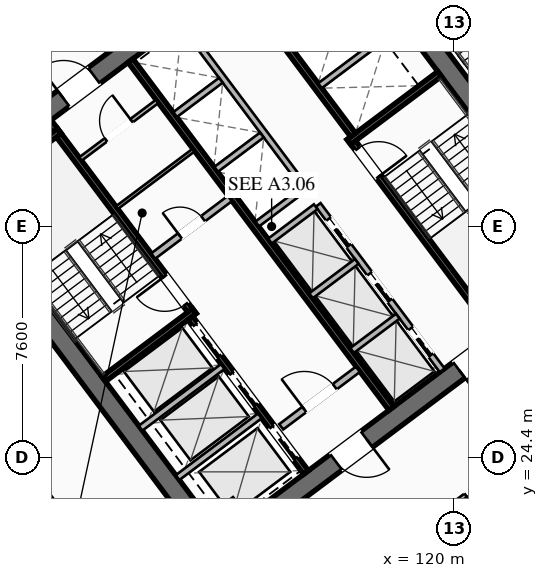
"""IFC4 building model, lengths in metres.
Left out: names, types, materials, properties, quantities, classifications, styles, units other than length and angle.
Written with IfcOpenShell. Run it as: python <this file> out.ifc"""

import sys

from ifc_helpers import new_model, si_unit, direction, frame, frame_2d, origin, place, context, subcontext, project, spatial, rectangle, extrude, element, fill, save


model = new_model("IFC4")
c1 = context("Model", 3, precision=1e-05, world=origin(), true_north=direction((0.0, 1.0)))
c2 = subcontext(c1, "Body", "Model", "MODEL_VIEW")
j1 = project(units=[si_unit("LENGTHUNIT", "METRE"), si_unit("PLANEANGLEUNIT", "RADIAN")], contexts=[c1])
p1 = place(None, origin())
s1 = spatial("IfcSite", under=j1, at=p1, CompositionType="ELEMENT")
p2 = place(p1, origin())
s2 = spatial("IfcBuilding", under=s1, at=p2, CompositionType="ELEMENT")
p3 = place(p2, frame((0.0, 0.0, 99.15)))
s3 = spatial("IfcBuildingStorey", under=s2, at=p3, CompositionType="ELEMENT", Elevation=99.15)
for number, where, z_axis, x_axis in (
    (1, (112.476, 21.107, 0.0), (0.0, 0.0, 1.0), (-0.6, 0.8, 0.0)),
    (2, (115.524, 42.893, 0.0), (0.0, 0.0, 1.0), (0.6, -0.8, 0.0)),
):
    element("IfcWall", number, at=place(p3, frame(where, z_axis=z_axis, x_axis=x_axis)), inside=s3, PredefinedType="SHEAR", context=c2, shape_type="SweptSolid", body=[
        extrude(rectangle(XDim=15.6, YDim=0.65, at=frame_2d((7.8, 0.0))), origin(), (0.0, 0.0, 1.0), 3.55),
    ])
p4 = place(p3, frame((124.429, 30.478, 0.0), z_axis=(0.0, 0.0, 1.0), x_axis=(-0.799998028465, -0.600002628705, 0.0)))
e3 = element("IfcWall", 3, at=p4, inside=s3, PredefinedType="SHEAR", context=c2, shape_type="SweptSolid", body=[
    extrude(rectangle(XDim=14.86, YDim=0.65, at=frame_2d((7.43, 0.0))), origin(), (0.0, 0.0, 1.0), 3.55),
])
p5 = place(p4, frame((9.13, 0.0, 0.0)))
e4 = element("IfcOpeningElement", 4, at=p5, cuts=e3, PredefinedType="OPENING", context=c2, shape_type="SweptSolid", body=[
    extrude(rectangle(XDim=1.25, YDim=2.25, at=frame_2d((0.625, 1.125))), frame((0.0, 0.335, 0.0), z_axis=(0.0, -1.0, 0.0), x_axis=(1.0, 0.0, 0.0)), (0.0, 0.0, 1.0), 0.67),
])
p6 = place(p4, frame((4.08, 0.0, 0.0)))
e5 = element("IfcOpeningElement", 5, at=p6, cuts=e3, PredefinedType="OPENING", context=c2, shape_type="SweptSolid", body=[
    extrude(rectangle(XDim=1.25, YDim=2.25, at=frame_2d((0.625, 1.125))), frame((0.0, 0.335, 0.0), z_axis=(0.0, -1.0, 0.0), x_axis=(1.0, 0.0, 0.0)), (0.0, 0.0, 1.0), 0.67),
])
p7 = place(p3, frame((103.571, 33.522, 0.0), z_axis=(0.0, 0.0, 1.0), x_axis=(0.799998028465, 0.600002628705, 0.0)))
e6 = element("IfcWall", 6, at=p7, inside=s3, PredefinedType="SHEAR", context=c2, shape_type="SweptSolid", body=[
    extrude(rectangle(XDim=14.86, YDim=0.65, at=frame_2d((7.43, 0.0))), origin(), (0.0, 0.0, 1.0), 3.55),
])
p8 = place(p7, frame((4.48, 0.0, 0.0)))
e7 = element("IfcOpeningElement", 7, at=p8, cuts=e6, PredefinedType="OPENING", context=c2, shape_type="SweptSolid", body=[
    extrude(rectangle(XDim=1.25, YDim=2.25, at=frame_2d((0.625, 1.125))), frame((0.0, 0.335, 0.0), z_axis=(0.0, -1.0, 0.0), x_axis=(1.0, 0.0, 0.0)), (0.0, 0.0, 1.0), 0.67),
])
p9 = place(p7, frame((9.53, 0.0, 0.0)))
e8 = element("IfcOpeningElement", 8, at=p9, cuts=e6, PredefinedType="OPENING", context=c2, shape_type="SweptSolid", body=[
    extrude(rectangle(XDim=1.25, YDim=2.25, at=frame_2d((0.625, 1.125))), frame((0.0, 0.335, 0.0), z_axis=(0.0, -1.0, 0.0), x_axis=(1.0, 0.0, 0.0)), (0.0, 0.0, 1.0), 0.67),
])
p10 = place(p3, frame((111.44, 29.08, 0.0), z_axis=(0.0, 0.0, 1.0), x_axis=(-0.600009827119, 0.799992629566, 0.0)))
e9 = element("IfcWall", 9, at=p10, inside=s3, PredefinedType="SHEAR", context=c2, shape_type="SweptSolid", body=[
    extrude(rectangle(XDim=7.95, YDim=0.2, at=frame_2d((3.975, 0.0))), origin(), (0.0, 0.0, 1.0), 3.35),
])
p11 = place(p10, frame((0.45, 0.0, 0.0)))
e10 = element("IfcOpeningElement", 10, at=p11, cuts=e9, PredefinedType="OPENING", context=c2, shape_type="SweptSolid", body=[
    extrude(rectangle(XDim=1.15, YDim=2.2, at=frame_2d((0.575, 1.1))), frame((0.0, 0.11, 0.0), z_axis=(0.0, -1.0, 0.0), x_axis=(1.0, 0.0, 0.0)), (0.0, 0.0, 1.0), 0.22),
])
for number, where, z_axis, x_axis in (
    (11, (108.476, 26.982, 0.0), (0.0, 0.0, 1.0), (0.8, 0.6, 0.0)),
    (12, (104.036, 32.902, 0.0), (0.0, 0.0, 1.0), (0.8, 0.6, 0.0)),
):
    element("IfcWall", number, at=place(p3, frame(where, z_axis=z_axis, x_axis=x_axis)), inside=s3, PredefinedType="SHEAR", context=c2, shape_type="SweptSolid", body=[
        extrude(rectangle(XDim=3.73, YDim=0.2, at=frame_2d((1.865, 0.0))), origin(), (0.0, 0.0, 1.0), 3.35),
    ])
p12 = place(p3, frame((116.56, 34.92, 0.0), z_axis=(0.0, 0.0, 1.0), x_axis=(0.600009827119, -0.799992629566, 0.0)))
e13 = element("IfcWall", 13, at=p12, inside=s3, PredefinedType="SHEAR", context=c2, shape_type="SweptSolid", body=[
    extrude(rectangle(XDim=7.95, YDim=0.2, at=frame_2d((3.975, 0.0))), origin(), (0.0, 0.0, 1.0), 3.35),
])
p13 = place(p12, frame((0.45, 0.0, 0.0)))
e14 = element("IfcOpeningElement", 14, at=p13, cuts=e13, PredefinedType="OPENING", context=c2, shape_type="SweptSolid", body=[
    extrude(rectangle(XDim=1.15, YDim=2.2, at=frame_2d((0.575, 1.1))), frame((0.0, 0.11, 0.0), z_axis=(0.0, -1.0, 0.0), x_axis=(1.0, 0.0, 0.0)), (0.0, 0.0, 1.0), 0.22),
])
p14 = place(p3, frame((116.54, 34.78, 0.0), z_axis=(0.0, 0.0, 1.0), x_axis=(0.799984290658, 0.600020945218, 0.0)))
e15 = element("IfcWall", 15, at=p14, inside=s3, PredefinedType="SHEAR", context=c2, shape_type="SweptSolid", body=[
    extrude(rectangle(XDim=3.73, YDim=0.2, at=frame_2d((1.865, 0.0))), origin(), (0.0, 0.0, 1.0), 3.35),
])
p15 = place(p3, frame((117.938, 26.016, 0.0), z_axis=(0.0, 0.0, 1.0), x_axis=(-0.600005463273, 0.799995902516, 0.0)))
e16 = element("IfcWall", 16, at=p15, inside=s3, PredefinedType="SHEAR", context=c2, shape_type="SweptSolid", body=[
    extrude(rectangle(XDim=14.3, YDim=0.2, at=frame_2d((7.15, 0.0))), origin(), (0.0, 0.0, 1.0), 3.35),
])
p16 = place(p3, frame((110.104, 31.028, 0.0), z_axis=(0.0, 0.0, 1.0), x_axis=(0.800018601094, 0.59997519774, 0.0)))
e17 = element("IfcWall", 17, at=p16, inside=s3, PredefinedType="SOLIDWALL", context=c2, shape_type="SweptSolid", body=[
    extrude(rectangle(XDim=3.15, YDim=0.22, at=frame_2d((1.575, 0.0))), origin(), (0.0, 0.0, 1.0), 2.703),
])
p17 = place(p16, frame((1.1, 0.0, 0.0)))
e18 = element("IfcOpeningElement", 18, at=p17, cuts=e17, PredefinedType="OPENING", context=c2, shape_type="SweptSolid", body=[
    extrude(rectangle(XDim=0.95, YDim=2.05, at=frame_2d((0.475, 1.025))), frame((0.0, 0.12, 0.0), z_axis=(0.0, -1.0, 0.0), x_axis=(1.0, 0.0, 0.0)), (0.0, 0.0, 1.0), 0.24),
])
p18 = place(p3, frame((114.316, 25.412, 0.0), z_axis=(0.0, 0.0, 1.0), x_axis=(0.800018601094, 0.59997519774, 0.0)))
e19 = element("IfcWall", 19, at=p18, inside=s3, PredefinedType="SOLIDWALL", context=c2, shape_type="SweptSolid", body=[
    extrude(rectangle(XDim=3.15, YDim=0.22, at=frame_2d((1.575, 0.0))), origin(), (0.0, 0.0, 1.0), 2.703),
])
p19 = place(p18, frame((0.95, 0.0, 0.0)))
e20 = element("IfcOpeningElement", 20, at=p19, cuts=e19, PredefinedType="OPENING", context=c2, shape_type="SweptSolid", body=[
    extrude(rectangle(XDim=1.25, YDim=2.25, at=frame_2d((0.625, 1.125))), frame((0.0, 0.12, 0.0), z_axis=(0.0, -1.0, 0.0), x_axis=(1.0, 0.0, 0.0)), (0.0, 0.0, 1.0), 0.24),
])
p20 = place(p3, frame((115.13, 23.91, 0.0), z_axis=(0.0, 0.0, 1.0), x_axis=(-0.599975393228, 0.800018454488, 0.0)))
e21 = element("IfcWall", 21, at=p20, inside=s3, PredefinedType="SHEAR", context=c2, shape_type="SweptSolid", body=[
    extrude(rectangle(XDim=6.35, YDim=0.2, at=frame_2d((3.175, 0.0))), origin(), (0.0, 0.0, 1.0), 3.35),
])
p21 = place(p20, frame((4.775, 0.0, 0.0)))
e22 = element("IfcOpeningElement", 22, at=p21, cuts=e21, PredefinedType="OPENING", context=c2, shape_type="SweptSolid", body=[
    extrude(rectangle(XDim=1.3, YDim=2.25, at=frame_2d((0.65, 1.125))), frame((0.0, 0.11, 0.0), z_axis=(0.0, -1.0, 0.0), x_axis=(1.0, 0.0, 0.0)), (0.0, 0.0, 1.0), 0.22),
])
p22 = place(p20, frame((2.775, 0.0, 0.0)))
e23 = element("IfcOpeningElement", 23, at=p22, cuts=e21, PredefinedType="OPENING", context=c2, shape_type="SweptSolid", body=[
    extrude(rectangle(XDim=1.3, YDim=2.25, at=frame_2d((0.65, 1.125))), frame((0.0, 0.11, 0.0), z_axis=(0.0, -1.0, 0.0), x_axis=(1.0, 0.0, 0.0)), (0.0, 0.0, 1.0), 0.22),
])
p23 = place(p20, frame((0.575, 0.0, 0.0)))
e24 = element("IfcOpeningElement", 24, at=p23, cuts=e21, PredefinedType="OPENING", context=c2, shape_type="SweptSolid", body=[
    extrude(rectangle(XDim=1.3, YDim=2.25, at=frame_2d((0.65, 1.125))), frame((0.0, 0.11, 0.0), z_axis=(0.0, -1.0, 0.0), x_axis=(1.0, 0.0, 0.0)), (0.0, 0.0, 1.0), 0.22),
])
for number, where, z_axis, x_axis in (
    (25, (110.906, 23.742, 0.0), (0.0, 0.0, 1.0), (0.8, 0.6, 0.0)),
    (26, (109.688, 25.366, 0.0), (0.0, 0.0, 1.0), (0.8, 0.6, 0.0)),
):
    element("IfcWall", number, at=place(p3, frame(where, z_axis=z_axis, x_axis=x_axis)), inside=s3, PredefinedType="SOLIDWALL", context=c2, shape_type="SweptSolid", body=[
        extrude(rectangle(XDim=3.38, YDim=0.2, at=frame_2d((1.69, 0.0))), origin(), (0.0, 0.0, 1.0), 3.35),
    ])
p24 = place(p3, frame((112.87, 40.09, 0.0), z_axis=(0.0, 0.0, 1.0), x_axis=(0.599975393228, -0.800018454488, 0.0)))
e27 = element("IfcWall", 27, at=p24, inside=s3, PredefinedType="SHEAR", context=c2, shape_type="SweptSolid", body=[
    extrude(rectangle(XDim=6.35, YDim=0.2, at=frame_2d((3.175, 0.0))), origin(), (0.0, 0.0, 1.0), 3.35),
])
p25 = place(p3, frame((115.59, 36.63, 0.0), z_axis=(0.0, 0.0, 1.0), x_axis=(0.799973995579, 0.600034670996, 0.0)))
e28 = element("IfcWall", 28, at=p25, inside=s3, PredefinedType="SOLIDWALL", context=c2, shape_type="SweptSolid", body=[
    extrude(rectangle(XDim=3.38, YDim=0.2, at=frame_2d((1.69, 0.0))), origin(), (0.0, 0.0, 1.0), 3.35),
])
p26 = place(p3, frame((107.71, 34.22, 0.0), z_axis=(0.0, 0.0, 1.0), x_axis=(0.799981399002, 0.60002480053, 0.0)))
e29 = element("IfcWall", 29, at=p26, inside=s3, PredefinedType="PARTITIONING", context=c2, shape_type="SweptSolid", body=[
    extrude(rectangle(XDim=3.15, YDim=0.135, at=frame_2d((1.575, 0.0))), origin(), (0.0, 0.0, 1.0), 2.703),
])
p27 = place(p26, frame((1.05, 0.0, 0.0)))
e30 = element("IfcOpeningElement", 30, at=p27, cuts=e29, PredefinedType="OPENING", context=c2, shape_type="SweptSolid", body=[
    extrude(rectangle(XDim=1.05, YDim=2.2, at=frame_2d((0.525, 1.1))), frame((0.0, 0.077, 0.0), z_axis=(0.0, -1.0, 0.0), x_axis=(1.0, 0.0, 0.0)), (0.0, 0.0, 1.0), 0.155),
])
p28 = place(p3, frame((108.91, 32.62, 0.0), z_axis=(0.0, 0.0, 1.0), x_axis=(0.800018601094, 0.59997519774, 0.0)))
e31 = element("IfcWall", 31, at=p28, inside=s3, PredefinedType="PARTITIONING", context=c2, shape_type="SweptSolid", body=[
    extrude(rectangle(XDim=3.15, YDim=0.11, at=frame_2d((1.575, 0.0))), origin(), (0.0, 0.0, 1.0), 2.703),
])
p29 = place(p3, frame((119.61, 27.27, 0.0), z_axis=(0.0, 0.0, 1.0), x_axis=(-0.600011488909, 0.79999138319, 0.0)))
e32 = element("IfcWall", 32, at=p29, inside=s3, PredefinedType="SOLIDWALL", context=c2, shape_type="SweptSolid", body=[
    extrude(rectangle(XDim=6.8, YDim=0.2, at=frame_2d((3.4, 0.0))), origin(), (0.0, 0.0, 1.0), 3.35),
])
p30 = place(p29, frame((0.625, 0.0, 0.0)))
e33 = element("IfcOpeningElement", 33, at=p30, cuts=e32, PredefinedType="OPENING", context=c2, shape_type="SweptSolid", body=[
    extrude(rectangle(XDim=1.1, YDim=2.2, at=frame_2d((0.55, 1.1))), frame((0.0, 0.11, 0.0), z_axis=(0.0, -1.0, 0.0), x_axis=(1.0, 0.0, 0.0)), (0.0, 0.0, 1.0), 0.22),
])
p31 = place(p29, frame((2.875, 0.0, 0.0)))
e34 = element("IfcOpeningElement", 34, at=p31, cuts=e32, PredefinedType="OPENING", context=c2, shape_type="SweptSolid", body=[
    extrude(rectangle(XDim=1.1, YDim=2.2, at=frame_2d((0.55, 1.1))), frame((0.0, 0.11, 0.0), z_axis=(0.0, -1.0, 0.0), x_axis=(1.0, 0.0, 0.0)), (0.0, 0.0, 1.0), 0.22),
])
p32 = place(p29, frame((5.125, 0.0, 0.0)))
e35 = element("IfcOpeningElement", 35, at=p32, cuts=e32, PredefinedType="OPENING", context=c2, shape_type="SweptSolid", body=[
    extrude(rectangle(XDim=1.1, YDim=2.2, at=frame_2d((0.55, 1.1))), frame((0.0, 0.11, 0.0), z_axis=(0.0, -1.0, 0.0), x_axis=(1.0, 0.0, 0.0)), (0.0, 0.0, 1.0), 0.22),
])
p33 = place(p3, frame((116.646, 27.922, 0.0), z_axis=(0.0, 0.0, 1.0), x_axis=(0.8, 0.6, 0.0)))
e36 = element("IfcWall", 36, at=p33, inside=s3, PredefinedType="SOLIDWALL", context=c2, shape_type="SweptSolid", body=[
    extrude(rectangle(XDim=1.88, YDim=0.2, at=frame_2d((0.94, 0.0))), origin(), (0.0, 0.0, 1.0), 3.35),
])
p34 = place(p3, frame((115.296, 29.722, 0.0), z_axis=(0.0, 0.0, 1.0), x_axis=(0.799984418148, 0.600020775241, 0.0)))
e37 = element("IfcWall", 37, at=p34, inside=s3, PredefinedType="SOLIDWALL", context=c2, shape_type="SweptSolid", body=[
    extrude(rectangle(XDim=1.88, YDim=0.2, at=frame_2d((0.94, 0.0))), origin(), (0.0, 0.0, 1.0), 3.35),
])
p35 = place(p3, frame((113.946, 31.522, 0.0), z_axis=(0.0, 0.0, 1.0), x_axis=(0.8, 0.6, 0.0)))
e38 = element("IfcWall", 38, at=p35, inside=s3, PredefinedType="SOLIDWALL", context=c2, shape_type="SweptSolid", body=[
    extrude(rectangle(XDim=1.88, YDim=0.2, at=frame_2d((0.94, 0.0))), origin(), (0.0, 0.0, 1.0), 3.35),
])
p36 = place(p3, frame((115.11, 33.27, 0.0), z_axis=(0.0, 0.0, 1.0), x_axis=(-0.600011488909, 0.79999138319, 0.0)))
e39 = element("IfcWall", 39, at=p36, inside=s3, PredefinedType="SOLIDWALL", context=c2, shape_type="SweptSolid", body=[
    extrude(rectangle(XDim=6.8, YDim=0.2, at=frame_2d((3.4, 0.0))), origin(), (0.0, 0.0, 1.0), 3.35),
])
p37 = place(p3, frame((113.526, 32.082, 0.0), z_axis=(0.0, 0.0, 1.0), x_axis=(0.800046745961, 0.599937666993, 0.0)))
e40 = element("IfcWall", 40, at=p37, inside=s3, PredefinedType="SOLIDWALL", context=c2, shape_type="SweptSolid", body=[
    extrude(rectangle(XDim=1.88, YDim=0.2, at=frame_2d((0.94, 0.0))), origin(), (0.0, 0.0, 1.0), 3.35),
])
p38 = place(p3, frame((112.176, 33.882, 0.0), z_axis=(0.0, 0.0, 1.0), x_axis=(0.8, 0.6, 0.0)))
e41 = element("IfcWall", 41, at=p38, inside=s3, PredefinedType="SOLIDWALL", context=c2, shape_type="SweptSolid", body=[
    extrude(rectangle(XDim=1.88, YDim=0.2, at=frame_2d((0.94, 0.0))), origin(), (0.0, 0.0, 1.0), 3.35),
])
p39 = place(p3, frame((110.826, 35.682, 0.0), z_axis=(0.0, 0.0, 1.0), x_axis=(0.799984418148, 0.600020775241, 0.0)))
e42 = element("IfcWall", 42, at=p39, inside=s3, PredefinedType="SOLIDWALL", context=c2, shape_type="SweptSolid", body=[
    extrude(rectangle(XDim=1.88, YDim=0.2, at=frame_2d((0.94, 0.0))), origin(), (0.0, 0.0, 1.0), 3.35),
])
p40 = place(p3, frame((98.516, 34.012, 0.0), z_axis=(0.0, 0.0, 1.0), x_axis=(0.8, 0.6, 0.0)))
e43 = element("IfcWall", 43, at=p40, inside=s3, PredefinedType="PARTITIONING", context=c2, shape_type="SweptSolid", body=[
    extrude(rectangle(XDim=28.23, YDim=0.135, at=frame_2d((14.115, 0.0))), origin(), (0.0, 0.0, 1.0), 2.703),
])
p41 = place(p40, frame((0.3, 0.0, 0.0)))
e44 = element("IfcOpeningElement", 44, at=p41, cuts=e43, PredefinedType="OPENING", context=c2, shape_type="SweptSolid", body=[
    extrude(rectangle(XDim=0.95, YDim=2.05, at=frame_2d((0.475, 1.025))), frame((0.0, 0.077, 0.0), z_axis=(0.0, -1.0, 0.0), x_axis=(1.0, 0.0, 0.0)), (0.0, 0.0, 1.0), 0.155),
])
p42 = place(p40, frame((10.962, 0.0, 0.0)))
e45 = element("IfcOpeningElement", 45, at=p42, cuts=e43, PredefinedType="OPENING", context=c2, shape_type="SweptSolid", body=[
    extrude(rectangle(XDim=0.95, YDim=2.05, at=frame_2d((0.475, 1.025))), frame((0.0, 0.077, 0.0), z_axis=(0.0, -1.0, 0.0), x_axis=(1.0, 0.0, 0.0)), (0.0, 0.0, 1.0), 0.155),
])
p43 = place(p40, frame((26.98, 0.0, 0.0)))
e46 = element("IfcOpeningElement", 46, at=p43, cuts=e43, PredefinedType="OPENING", context=c2, shape_type="SweptSolid", body=[
    extrude(rectangle(XDim=0.95, YDim=2.05, at=frame_2d((0.475, 1.025))), frame((0.0, 0.077, 0.0), z_axis=(0.0, -1.0, 0.0), x_axis=(1.0, 0.0, 0.0)), (0.0, 0.0, 1.0), 0.155),
])
p44 = place(p3, frame((134.18, 33.51, 0.0), z_axis=(0.0, 0.0, 1.0), x_axis=(-0.8, -0.6, 0.0)))
e47 = element("IfcWall", 47, at=p44, inside=s3, PredefinedType="PARTITIONING", context=c2, shape_type="SweptSolid", body=[
    extrude(rectangle(XDim=28.23, YDim=0.135, at=frame_2d((14.115, 0.0))), origin(), (0.0, 0.0, 1.0), 2.703),
])
p45 = place(p44, frame((26.9, 0.0, 0.0)))
e48 = element("IfcOpeningElement", 48, at=p45, cuts=e47, PredefinedType="OPENING", context=c2, shape_type="SweptSolid", body=[
    extrude(rectangle(XDim=0.95, YDim=2.05, at=frame_2d((0.475, 1.025))), frame((0.0, 0.077, 0.0), z_axis=(0.0, -1.0, 0.0), x_axis=(1.0, 0.0, 0.0)), (0.0, 0.0, 1.0), 0.155),
])
p46 = place(p44, frame((16.296, 0.0, 0.0)))
e49 = element("IfcOpeningElement", 49, at=p46, cuts=e47, PredefinedType="OPENING", context=c2, shape_type="SweptSolid", body=[
    extrude(rectangle(XDim=0.95, YDim=2.05, at=frame_2d((0.475, 1.025))), frame((0.0, 0.077, 0.0), z_axis=(0.0, -1.0, 0.0), x_axis=(1.0, 0.0, 0.0)), (0.0, 0.0, 1.0), 0.155),
])
p47 = place(p44, frame((10.433, 0.0, 0.0)))
e50 = element("IfcOpeningElement", 50, at=p47, cuts=e47, PredefinedType="OPENING", context=c2, shape_type="SweptSolid", body=[
    extrude(rectangle(XDim=0.95, YDim=2.05, at=frame_2d((0.475, 1.025))), frame((0.0, 0.077, 0.0), z_axis=(0.0, -1.0, 0.0), x_axis=(1.0, 0.0, 0.0)), (0.0, 0.0, 1.0), 0.155),
])
p48 = place(p44, frame((0.38, 0.0, 0.0)))
e51 = element("IfcOpeningElement", 51, at=p48, cuts=e47, PredefinedType="OPENING", context=c2, shape_type="SweptSolid", body=[
    extrude(rectangle(XDim=0.95, YDim=2.05, at=frame_2d((0.475, 1.025))), frame((0.0, 0.077, 0.0), z_axis=(0.0, -1.0, 0.0), x_axis=(1.0, 0.0, 0.0)), (0.0, 0.0, 1.0), 0.155),
])
p49 = place(p3, frame((111.548, 16.636, 0.0), z_axis=(0.0, 0.0, 1.0), x_axis=(-0.600003610192, 0.799997292343, 0.0)))
e52 = element("IfcWall", 52, at=p49, inside=s3, PredefinedType="PARTITIONING", context=c2, shape_type="SweptSolid", body=[
    extrude(rectangle(XDim=21.64, YDim=0.135, at=frame_2d((10.82, 0.0))), origin(), (0.0, 0.0, 1.0), 2.703),
])
p50 = place(p49, frame((0.3, 0.0, 0.0)))
e53 = element("IfcOpeningElement", 53, at=p50, cuts=e52, PredefinedType="OPENING", context=c2, shape_type="SweptSolid", body=[
    extrude(rectangle(XDim=0.95, YDim=2.05, at=frame_2d((0.475, 1.025))), frame((0.0, 0.077, 0.0), z_axis=(0.0, -1.0, 0.0), x_axis=(1.0, 0.0, 0.0)), (0.0, 0.0, 1.0), 0.155),
])
p51 = place(p8, origin())
e54 = element("IfcDoor", 54, at=p51, inside=s3, OperationType="SINGLE_SWING_LEFT", PredefinedType="DOOR", context=c2, shape_type="SweptSolid", body=[
    extrude(rectangle(XDim=1.25, YDim=2.25, at=frame_2d((0.625, 1.125))), frame((0.0, 0.025, 0.0), z_axis=(0.0, -1.0, 0.0), x_axis=(1.0, 0.0, 0.0)), (0.0, 0.0, 1.0), 0.05),
])
fill(e7, e54)
p52 = place(p5, origin())
e55 = element("IfcDoor", 55, at=p52, inside=s3, OperationType="SINGLE_SWING_LEFT", PredefinedType="DOOR", context=c2, shape_type="SweptSolid", body=[
    extrude(rectangle(XDim=1.25, YDim=2.25, at=frame_2d((0.625, 1.125))), frame((0.0, 0.025, 0.0), z_axis=(0.0, -1.0, 0.0), x_axis=(1.0, 0.0, 0.0)), (0.0, 0.0, 1.0), 0.05),
])
fill(e4, e55)
p53 = place(p6, origin())
e56 = element("IfcDoor", 56, at=p53, inside=s3, OperationType="SINGLE_SWING_RIGHT", PredefinedType="DOOR", context=c2, shape_type="SweptSolid", body=[
    extrude(rectangle(XDim=1.25, YDim=2.25, at=frame_2d((0.625, 1.125))), frame((0.0, 0.025, 0.0), z_axis=(0.0, -1.0, 0.0), x_axis=(1.0, 0.0, 0.0)), (0.0, 0.0, 1.0), 0.05),
])
fill(e5, e56)
p54 = place(p11, origin())
e57 = element("IfcDoor", 57, at=p54, inside=s3, OperationType="SINGLE_SWING_RIGHT", PredefinedType="DOOR", context=c2, shape_type="SweptSolid", body=[
    extrude(rectangle(XDim=1.15, YDim=2.2, at=frame_2d((0.575, 1.1))), frame((0.0, 0.025, 0.0), z_axis=(0.0, -1.0, 0.0), x_axis=(1.0, 0.0, 0.0)), (0.0, 0.0, 1.0), 0.05),
])
fill(e10, e57)
p55 = place(p13, origin())
e58 = element("IfcDoor", 58, at=p55, inside=s3, OperationType="SINGLE_SWING_RIGHT", PredefinedType="DOOR", context=c2, shape_type="SweptSolid", body=[
    extrude(rectangle(XDim=1.15, YDim=2.2, at=frame_2d((0.575, 1.1))), frame((0.0, 0.025, 0.0), z_axis=(0.0, -1.0, 0.0), x_axis=(1.0, 0.0, 0.0)), (0.0, 0.0, 1.0), 0.05),
])
fill(e14, e58)
p56 = place(p19, origin())
e59 = element("IfcDoor", 59, at=p56, inside=s3, OperationType="SINGLE_SWING_LEFT", PredefinedType="DOOR", context=c2, shape_type="SweptSolid", body=[
    extrude(rectangle(XDim=1.25, YDim=2.25, at=frame_2d((0.625, 1.125))), frame((0.0, 0.025, 0.0), z_axis=(0.0, -1.0, 0.0), x_axis=(1.0, 0.0, 0.0)), (0.0, 0.0, 1.0), 0.05),
])
fill(e20, e59)
p57 = place(p27, origin())
e60 = element("IfcDoor", 60, at=p57, inside=s3, OperationType="SINGLE_SWING_RIGHT", PredefinedType="DOOR", context=c2, shape_type="SweptSolid", body=[
    extrude(rectangle(XDim=1.05, YDim=2.2, at=frame_2d((0.525, 1.1))), frame((0.0, 0.025, 0.0), z_axis=(0.0, -1.0, 0.0), x_axis=(1.0, 0.0, 0.0)), (0.0, 0.0, 1.0), 0.05),
])
fill(e30, e60)
p58 = place(p17, origin())
e61 = element("IfcDoor", 61, at=p58, inside=s3, OperationType="SINGLE_SWING_LEFT", PredefinedType="DOOR", context=c2, shape_type="SweptSolid", body=[
    extrude(rectangle(XDim=0.95, YDim=2.05, at=frame_2d((0.475, 1.025))), frame((0.0, 0.025, 0.0), z_axis=(0.0, -1.0, 0.0), x_axis=(1.0, 0.0, 0.0)), (0.0, 0.0, 1.0), 0.05),
])
fill(e18, e61)
p59 = place(p46, origin())
e62 = element("IfcDoor", 62, at=p59, inside=s3, OperationType="SINGLE_SWING_RIGHT", PredefinedType="DOOR", context=c2, shape_type="SweptSolid", body=[
    extrude(rectangle(XDim=0.95, YDim=2.05, at=frame_2d((0.475, 1.025))), frame((0.0, 0.025, 0.0), z_axis=(0.0, -1.0, 0.0), x_axis=(1.0, 0.0, 0.0)), (0.0, 0.0, 1.0), 0.05),
])
fill(e49, e62)
p60 = place(p21, origin())
e63 = element("IfcDoor", 63, at=p60, inside=s3, OperationType="SLIDING_TO_LEFT", PredefinedType="DOOR", context=c2, shape_type="SweptSolid", body=[
    extrude(rectangle(XDim=1.3, YDim=2.25, at=frame_2d((0.65, 1.125))), frame((0.0, 0.025, 0.0), z_axis=(0.0, -1.0, 0.0), x_axis=(1.0, 0.0, 0.0)), (0.0, 0.0, 1.0), 0.05),
])
fill(e22, e63)
p61 = place(p22, origin())
e64 = element("IfcDoor", 64, at=p61, inside=s3, OperationType="SLIDING_TO_LEFT", PredefinedType="DOOR", context=c2, shape_type="SweptSolid", body=[
    extrude(rectangle(XDim=1.3, YDim=2.25, at=frame_2d((0.65, 1.125))), frame((0.0, 0.025, 0.0), z_axis=(0.0, -1.0, 0.0), x_axis=(1.0, 0.0, 0.0)), (0.0, 0.0, 1.0), 0.05),
])
fill(e23, e64)
p62 = place(p23, origin())
e65 = element("IfcDoor", 65, at=p62, inside=s3, OperationType="SLIDING_TO_LEFT", PredefinedType="DOOR", context=c2, shape_type="SweptSolid", body=[
    extrude(rectangle(XDim=1.3, YDim=2.25, at=frame_2d((0.65, 1.125))), frame((0.0, 0.025, 0.0), z_axis=(0.0, -1.0, 0.0), x_axis=(1.0, 0.0, 0.0)), (0.0, 0.0, 1.0), 0.05),
])
fill(e24, e65)
p63 = place(p30, origin())
e66 = element("IfcDoor", 66, at=p63, inside=s3, OperationType="SLIDING_TO_LEFT", PredefinedType="DOOR", context=c2, shape_type="SweptSolid", body=[
    extrude(rectangle(XDim=1.1, YDim=2.2, at=frame_2d((0.55, 1.1))), frame((0.0, 0.025, 0.0), z_axis=(0.0, -1.0, 0.0), x_axis=(1.0, 0.0, 0.0)), (0.0, 0.0, 1.0), 0.05),
])
fill(e33, e66)
p64 = place(p31, origin())
e67 = element("IfcDoor", 67, at=p64, inside=s3, OperationType="SLIDING_TO_LEFT", PredefinedType="DOOR", context=c2, shape_type="SweptSolid", body=[
    extrude(rectangle(XDim=1.1, YDim=2.2, at=frame_2d((0.55, 1.1))), frame((0.0, 0.025, 0.0), z_axis=(0.0, -1.0, 0.0), x_axis=(1.0, 0.0, 0.0)), (0.0, 0.0, 1.0), 0.05),
])
fill(e34, e67)
p65 = place(p32, origin())
e68 = element("IfcDoor", 68, at=p65, inside=s3, OperationType="SLIDING_TO_LEFT", PredefinedType="DOOR", context=c2, shape_type="SweptSolid", body=[
    extrude(rectangle(XDim=1.1, YDim=2.2, at=frame_2d((0.55, 1.1))), frame((0.0, 0.025, 0.0), z_axis=(0.0, -1.0, 0.0), x_axis=(1.0, 0.0, 0.0)), (0.0, 0.0, 1.0), 0.05),
])
fill(e35, e68)
save(model, sys.argv[1])
